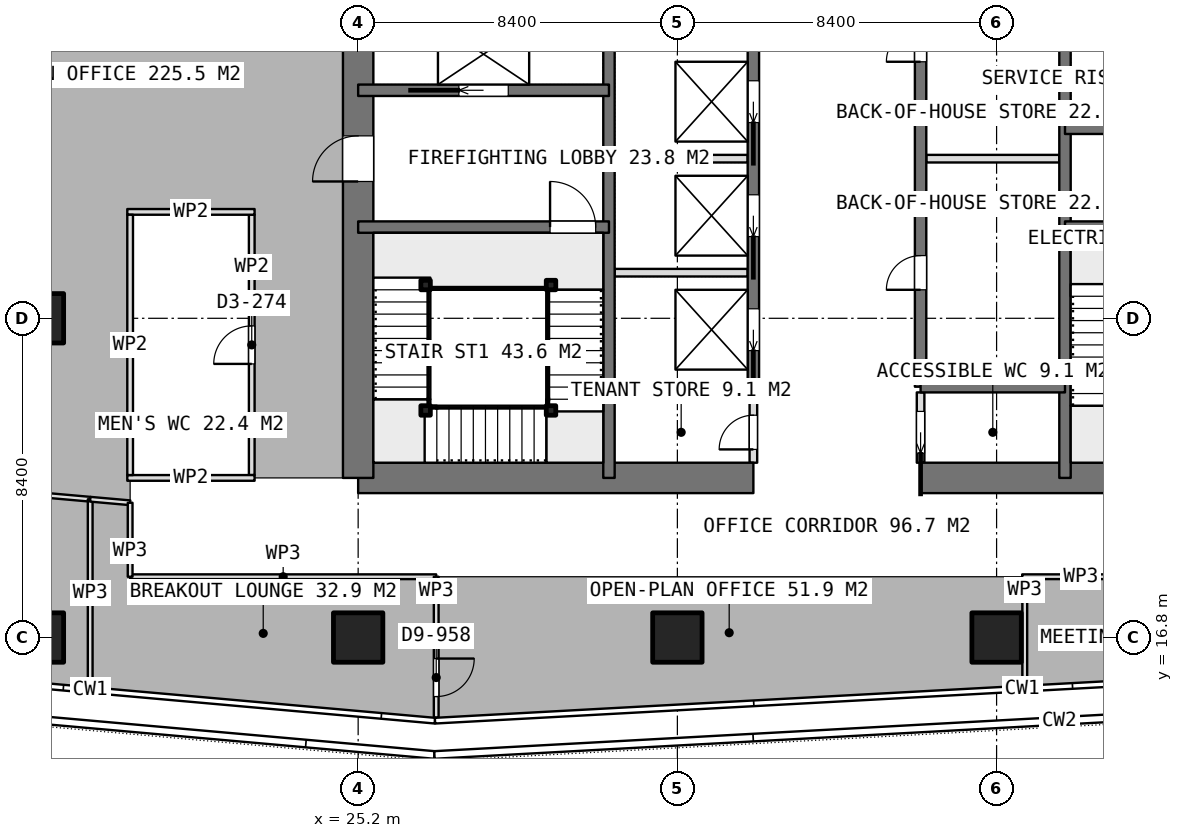
"""IFC4 building model, lengths in metres.
Left out: names, types, materials, properties, quantities, classifications, styles, units other than length and angle.
Written with IfcOpenShell. Run it as: python <this file> out.ifc"""

import sys

from ifc_helpers import new_model, si_unit, direction, frame, frame_2d, origin, origin_2d, place, context, subcontext, project, spatial, rectangle, extrude, element, fill, save


model = new_model("IFC4")
c1 = context("Model", 3, precision=1e-05, world=origin(), true_north=direction((0.0, 1.0)))
c2 = subcontext(c1, "Body", "Model", "MODEL_VIEW")
j1 = project(units=[si_unit("LENGTHUNIT", "METRE"), si_unit("PLANEANGLEUNIT", "RADIAN")], contexts=[c1])
p1 = place(None, origin())
s1 = spatial("IfcSite", under=j1, at=p1, CompositionType="ELEMENT")
p2 = place(p1, origin())
s2 = spatial("IfcBuilding", under=s1, at=p2, CompositionType="ELEMENT")
p3 = place(p2, frame((0.0, 0.0, 257.6)))
s3 = spatial("IfcBuildingStorey", under=s2, at=p3, CompositionType="ELEMENT", Elevation=257.6)
p4 = place(p3, frame((25.2, 21.0, 0.0), z_axis=(0.0, 0.0, 1.0), x_axis=(1.0, 0.0, 0.0)))
e1 = element("IfcWall", 1, at=p4, inside=s3, PredefinedType="SHEAR", context=c2, shape_type="SweptSolid", body=[
    extrude(rectangle(XDim=10.4, YDim=0.8, at=frame_2d((5.2, 0.0))), origin(), (0.0, 0.0, 1.0), 3.75),
])
p5 = place(p3, frame((40.0, 21.0, 0.0), z_axis=(0.0, 0.0, 1.0), x_axis=(1.0, 0.0, 0.0)))
e2 = element("IfcWall", 2, at=p5, inside=s3, PredefinedType="SHEAR", context=c2, shape_type="SweptSolid", body=[
    extrude(rectangle(XDim=10.4, YDim=0.8, at=frame_2d((5.2, 0.0))), origin(), (0.0, 0.0, 1.0), 3.75),
])
p6 = place(p3, frame((25.2, 21.0, 0.0), z_axis=(0.0, 0.0, 1.0), x_axis=(0.0, 1.0, 0.0)))
e3 = element("IfcWall", 3, at=p6, inside=s3, PredefinedType="SHEAR", context=c2, shape_type="SweptSolid", body=[
    extrude(rectangle(XDim=25.2, YDim=0.8, at=frame_2d((12.6, 0.0))), origin(), (0.0, 0.0, 1.0), 3.75),
])
p7 = place(p6, frame((7.8, 0.0, 0.0)))
e4 = element("IfcOpeningElement", 4, at=p7, cuts=e3, PredefinedType="OPENING", context=c2, shape_type="SweptSolid", body=[
    extrude(rectangle(XDim=1.2, YDim=2.1, at=frame_2d((0.6, 1.05))), frame((0.0, 0.41, 0.0), z_axis=(0.0, -1.0, 0.0), x_axis=(1.0, 0.0, 0.0)), (0.0, 0.0, 1.0), 0.82),
])
p8 = place(p6, frame((14.25, 0.0, 0.0)))
e5 = element("IfcOpeningElement", 5, at=p8, cuts=e3, PredefinedType="OPENING", context=c2, shape_type="SweptSolid", body=[
    extrude(rectangle(XDim=0.9, YDim=2.1, at=frame_2d((0.45, 1.05))), frame((0.0, 0.41, 0.0), z_axis=(0.0, -1.0, 0.0), x_axis=(1.0, 0.0, 0.0)), (0.0, 0.0, 1.0), 0.82),
])
p9 = place(p6, frame((16.85, 0.0, 0.0)))
e6 = element("IfcOpeningElement", 6, at=p9, cuts=e3, PredefinedType="OPENING", context=c2, shape_type="SweptSolid", body=[
    extrude(rectangle(XDim=0.9, YDim=2.1, at=frame_2d((0.45, 1.05))), frame((0.0, 0.41, 0.0), z_axis=(0.0, -1.0, 0.0), x_axis=(1.0, 0.0, 0.0)), (0.0, 0.0, 1.0), 0.82),
])
p10 = place(p6, frame((18.95, 0.0, 0.0)))
e7 = element("IfcOpeningElement", 7, at=p10, cuts=e3, PredefinedType="OPENING", context=c2, shape_type="SweptSolid", body=[
    extrude(rectangle(XDim=1.2, YDim=2.1, at=frame_2d((0.6, 1.05))), frame((0.0, 0.41, 0.0), z_axis=(0.0, -1.0, 0.0), x_axis=(1.0, 0.0, 0.0)), (0.0, 0.0, 1.0), 0.82),
])
for number, where, z_axis, x_axis in (
    (8, (31.8, 21.0, 0.0), (0.0, 0.0, 1.0), (0.0, 1.0, 0.0)),
    (9, (43.8, 21.0, 0.0), (0.0, 0.0, 1.0), (0.0, 1.0, 0.0)),
):
    element("IfcWall", number, at=place(p3, frame(where, z_axis=z_axis, x_axis=x_axis)), inside=s3, PredefinedType="SHEAR", context=c2, shape_type="SweptSolid", body=[
        extrude(rectangle(XDim=25.2, YDim=0.3, at=frame_2d((12.6, 0.0))), origin(), (0.0, 0.0, 1.0), 3.75),
    ])
p11 = place(p3, frame((35.6, 23.4, 0.0), z_axis=(0.0, 0.0, 1.0), x_axis=(0.0, 1.0, 0.0)))
e10 = element("IfcWall", 10, at=p11, inside=s3, PredefinedType="SHEAR", context=c2, shape_type="SweptSolid", body=[
    extrude(rectangle(XDim=18.0, YDim=0.3, at=frame_2d((9.0, 0.0))), origin(), (0.0, 0.0, 1.0), 3.75),
])
p12 = place(p11, frame((0.95, 0.0, 0.0)))
e11 = element("IfcOpeningElement", 11, at=p12, cuts=e10, PredefinedType="OPENING", context=c2, shape_type="SweptSolid", body=[
    extrude(rectangle(XDim=1.1, YDim=2.1, at=frame_2d((0.55, 1.05))), frame((0.0, 0.16, 0.0), z_axis=(0.0, -1.0, 0.0), x_axis=(1.0, 0.0, 0.0)), (0.0, 0.0, 1.0), 0.32),
])
p13 = place(p11, frame((3.95, 0.0, 0.0)))
e12 = element("IfcOpeningElement", 12, at=p13, cuts=e10, PredefinedType="OPENING", context=c2, shape_type="SweptSolid", body=[
    extrude(rectangle(XDim=1.1, YDim=2.1, at=frame_2d((0.55, 1.05))), frame((0.0, 0.16, 0.0), z_axis=(0.0, -1.0, 0.0), x_axis=(1.0, 0.0, 0.0)), (0.0, 0.0, 1.0), 0.32),
])
p14 = place(p11, frame((6.95, 0.0, 0.0)))
e13 = element("IfcOpeningElement", 13, at=p14, cuts=e10, PredefinedType="OPENING", context=c2, shape_type="SweptSolid", body=[
    extrude(rectangle(XDim=1.1, YDim=2.1, at=frame_2d((0.55, 1.05))), frame((0.0, 0.16, 0.0), z_axis=(0.0, -1.0, 0.0), x_axis=(1.0, 0.0, 0.0)), (0.0, 0.0, 1.0), 0.32),
])
p15 = place(p11, frame((9.95, 0.0, 0.0)))
e14 = element("IfcOpeningElement", 14, at=p15, cuts=e10, PredefinedType="OPENING", context=c2, shape_type="SweptSolid", body=[
    extrude(rectangle(XDim=1.1, YDim=2.1, at=frame_2d((0.55, 1.05))), frame((0.0, 0.16, 0.0), z_axis=(0.0, -1.0, 0.0), x_axis=(1.0, 0.0, 0.0)), (0.0, 0.0, 1.0), 0.32),
])
p16 = place(p11, frame((12.95, 0.0, 0.0)))
e15 = element("IfcOpeningElement", 15, at=p16, cuts=e10, PredefinedType="OPENING", context=c2, shape_type="SweptSolid", body=[
    extrude(rectangle(XDim=1.1, YDim=2.1, at=frame_2d((0.55, 1.05))), frame((0.0, 0.16, 0.0), z_axis=(0.0, -1.0, 0.0), x_axis=(1.0, 0.0, 0.0)), (0.0, 0.0, 1.0), 0.32),
])
p17 = place(p11, frame((15.95, 0.0, 0.0)))
e16 = element("IfcOpeningElement", 16, at=p17, cuts=e10, PredefinedType="OPENING", context=c2, shape_type="SweptSolid", body=[
    extrude(rectangle(XDim=1.1, YDim=2.1, at=frame_2d((0.55, 1.05))), frame((0.0, 0.16, 0.0), z_axis=(0.0, -1.0, 0.0), x_axis=(1.0, 0.0, 0.0)), (0.0, 0.0, 1.0), 0.32),
])
p18 = place(p3, frame((40.0, 23.4, 0.0), z_axis=(0.0, 0.0, 1.0), x_axis=(0.0, 1.0, 0.0)))
e17 = element("IfcWall", 17, at=p18, inside=s3, PredefinedType="SHEAR", context=c2, shape_type="SweptSolid", body=[
    extrude(rectangle(XDim=18.0, YDim=0.3, at=frame_2d((9.0, 0.0))), origin(), (0.0, 0.0, 1.0), 3.75),
])
p19 = place(p18, frame((2.55, 0.0, 0.0)))
e18 = element("IfcOpeningElement", 18, at=p19, cuts=e17, PredefinedType="OPENING", context=c2, shape_type="SweptSolid", body=[
    extrude(rectangle(XDim=0.9, YDim=2.1, at=frame_2d((0.45, 1.05))), frame((0.0, 0.16, 0.0), z_axis=(0.0, -1.0, 0.0), x_axis=(1.0, 0.0, 0.0)), (0.0, 0.0, 1.0), 0.32),
])
p20 = place(p18, frame((8.55, 0.0, 0.0)))
e19 = element("IfcOpeningElement", 19, at=p20, cuts=e17, PredefinedType="OPENING", context=c2, shape_type="SweptSolid", body=[
    extrude(rectangle(XDim=0.9, YDim=2.1, at=frame_2d((0.45, 1.05))), frame((0.0, 0.16, 0.0), z_axis=(0.0, -1.0, 0.0), x_axis=(1.0, 0.0, 0.0)), (0.0, 0.0, 1.0), 0.32),
])
for number, where, z_axis, x_axis in (
    (20, (31.8, 23.4, 0.0), (0.0, 0.0, 1.0), (1.0, 0.0, 0.0)),
    (21, (40.0, 23.4, 0.0), (0.0, 0.0, 1.0), (1.0, 0.0, 0.0)),
):
    element("IfcWall", number, at=place(p3, frame(where, z_axis=z_axis, x_axis=x_axis)), inside=s3, PredefinedType="SHEAR", context=c2, shape_type="SweptSolid", body=[
        extrude(rectangle(XDim=3.8, YDim=0.3, at=frame_2d((1.9, 0.0))), origin(), (0.0, 0.0, 1.0), 3.75),
    ])
p21 = place(p3, frame((25.2, 27.6, 0.0), z_axis=(0.0, 0.0, 1.0), x_axis=(1.0, 0.0, 0.0)))
e22 = element("IfcWall", 22, at=p21, inside=s3, PredefinedType="SHEAR", context=c2, shape_type="SweptSolid", body=[
    extrude(rectangle(XDim=6.6, YDim=0.3, at=frame_2d((3.3, 0.0))), origin(), (0.0, 0.0, 1.0), 3.75),
])
p22 = place(p21, frame((5.05, 0.0, 0.0)))
e23 = element("IfcOpeningElement", 23, at=p22, cuts=e22, PredefinedType="OPENING", context=c2, shape_type="SweptSolid", body=[
    extrude(rectangle(XDim=1.2, YDim=2.1, at=frame_2d((0.6, 1.05))), frame((0.0, 0.16, 0.0), z_axis=(0.0, -1.0, 0.0), x_axis=(1.0, 0.0, 0.0)), (0.0, 0.0, 1.0), 0.32),
])
p23 = place(p3, frame((25.2, 31.2, 0.0), z_axis=(0.0, 0.0, 1.0), x_axis=(1.0, 0.0, 0.0)))
e24 = element("IfcWall", 24, at=p23, inside=s3, PredefinedType="SHEAR", context=c2, shape_type="SweptSolid", body=[
    extrude(rectangle(XDim=6.6, YDim=0.3, at=frame_2d((3.3, 0.0))), origin(), (0.0, 0.0, 1.0), 3.75),
])
p24 = place(p23, frame((2.65, 0.0, 0.0)))
e25 = element("IfcOpeningElement", 25, at=p24, cuts=e24, PredefinedType="OPENING", context=c2, shape_type="SweptSolid", body=[
    extrude(rectangle(XDim=1.3, YDim=2.1, at=frame_2d((0.65, 1.05))), frame((0.0, 0.16, 0.0), z_axis=(0.0, -1.0, 0.0), x_axis=(1.0, 0.0, 0.0)), (0.0, 0.0, 1.0), 0.32),
])
for number, where, z_axis, x_axis in (
    (26, (43.8, 27.6, 0.0), (0.0, 0.0, 1.0), (1.0, 0.0, 0.0)),
    (27, (43.8, 30.2, 0.0), (0.0, 0.0, 1.0), (1.0, 0.0, 0.0)),
):
    element("IfcWall", number, at=place(p3, frame(where, z_axis=z_axis, x_axis=x_axis)), inside=s3, PredefinedType="SHEAR", context=c2, shape_type="SweptSolid", body=[
        extrude(rectangle(XDim=6.6, YDim=0.3, at=frame_2d((3.3, 0.0))), origin(), (0.0, 0.0, 1.0), 3.75),
    ])
for number, where, z_axis, x_axis in (
    (28, (16.8, 16.8, 0.0), (0.0, 0.0, 1.0), (1.0, 0.0, 0.0)),
    (29, (16.8, 25.2, 0.0), (0.0, 0.0, 1.0), (1.0, 0.0, 0.0)),
    (30, (25.2, 16.8, 0.0), (0.0, 0.0, 1.0), (1.0, 0.0, 0.0)),
    (31, (33.6, 16.8, 0.0), (0.0, 0.0, 1.0), (1.0, 0.0, 0.0)),
    (32, (42.0, 16.8, 0.0), (0.0, 0.0, 1.0), (1.0, 0.0, 0.0)),
):
    element("IfcColumn", number, at=place(p3, frame(where, z_axis=z_axis, x_axis=x_axis)), inside=s3, PredefinedType="COLUMN", context=c2, shape_type="SweptSolid", body=[
        extrude(rectangle(XDim=1.3, YDim=1.3, at=origin_2d()), origin(), (0.0, 0.0, 1.0), 3.75),
    ])
for number, where, z_axis, x_axis in (
    (33, (31.95, 26.4, 0.0), (0.0, 0.0, 1.0), (1.0, 0.0, 0.0)),
    (34, (31.95, 29.4, 0.0), (0.0, 0.0, 1.0), (1.0, 0.0, 0.0)),
    (35, (40.15, 29.4, 0.0), (0.0, 0.0, 1.0), (1.0, 0.0, 0.0)),
):
    element("IfcWall", number, at=place(p3, frame(where, z_axis=z_axis, x_axis=x_axis)), inside=s3, PredefinedType="PARTITIONING", context=c2, shape_type="SweptSolid", body=[
        extrude(rectangle(XDim=3.5, YDim=0.2, at=frame_2d((1.75, 0.0))), origin(), (0.0, 0.0, 1.0), 3.5),
    ])
p25 = place(p3, frame((40.0, 21.4, 0.0), z_axis=(0.0, 0.0, 1.0), x_axis=(0.0, 1.0, 0.0)))
e36 = element("IfcWall", 36, at=p25, inside=s3, PredefinedType="PARTITIONING", context=c2, shape_type="SweptSolid", body=[
    extrude(rectangle(XDim=1.85, YDim=0.2, at=frame_2d((0.925, 0.0))), origin(), (0.0, 0.0, 1.0), 3.5),
])
p26 = place(p25, frame((0.25, 0.0, 0.0)))
e37 = element("IfcOpeningElement", 37, at=p26, cuts=e36, PredefinedType="OPENING", context=c2, shape_type="SweptSolid", body=[
    extrude(rectangle(XDim=1.1, YDim=2.1, at=frame_2d((0.55, 1.05))), frame((0.0, 0.11, 0.0), z_axis=(0.0, -1.0, 0.0), x_axis=(1.0, 0.0, 0.0)), (0.0, 0.0, 1.0), 0.22),
])
p27 = place(p3, frame((35.6, 21.4, 0.0), z_axis=(0.0, 0.0, 1.0), x_axis=(0.0, 1.0, 0.0)))
e38 = element("IfcWall", 38, at=p27, inside=s3, PredefinedType="PARTITIONING", context=c2, shape_type="SweptSolid", body=[
    extrude(rectangle(XDim=1.85, YDim=0.2, at=frame_2d((0.925, 0.0))), origin(), (0.0, 0.0, 1.0), 3.5),
])
p28 = place(p27, frame((0.35, 0.0, 0.0)))
e39 = element("IfcOpeningElement", 39, at=p28, cuts=e38, PredefinedType="OPENING", context=c2, shape_type="SweptSolid", body=[
    extrude(rectangle(XDim=0.9, YDim=2.1, at=frame_2d((0.45, 1.05))), frame((0.0, 0.11, 0.0), z_axis=(0.0, -1.0, 0.0), x_axis=(1.0, 0.0, 0.0)), (0.0, 0.0, 1.0), 0.22),
])
for number, where, z_axis, x_axis in (
    (40, (19.125, 21.0, 0.0), (0.0, 0.0, 1.0), (1.0, 0.0, 0.0)),
    (41, (19.125, 28.0, 0.0), (0.0, 0.0, 1.0), (1.0, 0.0, 0.0)),
):
    element("IfcWall", number, at=place(p3, frame(where, z_axis=z_axis, x_axis=x_axis)), inside=s3, PredefinedType="PARTITIONING", context=c2, shape_type="SweptSolid", body=[
        extrude(rectangle(XDim=3.35, YDim=0.15, at=frame_2d((1.675, 0.0))), origin(), (0.0, 0.0, 1.0), 3.5),
    ])
p29 = place(p3, frame((19.2, 21.075, 0.0), z_axis=(0.0, 0.0, 1.0), x_axis=(0.0, 1.0, 0.0)))
e42 = element("IfcWall", 42, at=p29, inside=s3, PredefinedType="PARTITIONING", context=c2, shape_type="SweptSolid", body=[
    extrude(rectangle(XDim=6.85, YDim=0.15, at=frame_2d((3.425, 0.0))), origin(), (0.0, 0.0, 1.0), 3.5),
])
p30 = place(p3, frame((22.4, 21.075, 0.0), z_axis=(0.0, 0.0, 1.0), x_axis=(0.0, 1.0, 0.0)))
e43 = element("IfcWall", 43, at=p30, inside=s3, PredefinedType="PARTITIONING", context=c2, shape_type="SweptSolid", body=[
    extrude(rectangle(XDim=6.85, YDim=0.15, at=frame_2d((3.425, 0.0))), origin(), (0.0, 0.0, 1.0), 3.5),
])
p31 = place(p30, frame((2.925, 0.0, 0.0)))
e44 = element("IfcOpeningElement", 44, at=p31, cuts=e43, PredefinedType="OPENING", context=c2, shape_type="SweptSolid", body=[
    extrude(rectangle(XDim=1.0, YDim=2.1, at=frame_2d((0.5, 1.05))), frame((0.0, 0.085, 0.0), z_axis=(0.0, -1.0, 0.0), x_axis=(1.0, 0.0, 0.0)), (0.0, 0.0, 1.0), 0.17),
])
p32 = place(p3, frame((42.742, 15.538, 0.0), z_axis=(0.0, 0.0, 1.0), x_axis=(0.0, 1.0, 0.0)))
e45 = element("IfcWall", 45, at=p32, inside=s3, PredefinedType="PARTITIONING", context=c2, shape_type="SweptSolid", body=[
    extrude(rectangle(XDim=2.799, YDim=0.125, at=frame_2d((1.399, 0.0))), origin(), (0.0, 0.0, 1.0), 3.5),
])
p33 = place(p3, frame((42.674, 18.4, 0.0), z_axis=(0.0, 0.0, 1.0), x_axis=(1.0, 0.0, 0.0)))
e46 = element("IfcWall", 46, at=p33, inside=s3, PredefinedType="PARTITIONING", context=c2, shape_type="SweptSolid", body=[
    extrude(rectangle(XDim=7.726, YDim=0.125, at=frame_2d((3.863, 0.0))), origin(), (0.0, 0.0, 1.0), 3.5),
])
p34 = place(p33, frame((3.363, 0.0, 0.0)))
e47 = element("IfcOpeningElement", 47, at=p34, cuts=e46, PredefinedType="OPENING", context=c2, shape_type="SweptSolid", body=[
    extrude(rectangle(XDim=1.0, YDim=2.1, at=frame_2d((0.5, 1.05))), frame((0.0, 0.073, 0.0), z_axis=(0.0, -1.0, 0.0), x_axis=(1.0, 0.0, 0.0)), (0.0, 0.0, 1.0), 0.145),
])
p35 = place(p3, frame((12.261, 20.962, 0.0), z_axis=(0.0, 0.0, 1.0), x_axis=(0.996078951833, -0.08846876124, 0.0)))
e48 = element("IfcWall", 48, at=p35, inside=s3, PredefinedType="PARTITIONING", context=c2, shape_type="SweptSolid", body=[
    extrude(rectangle(XDim=5.911, YDim=0.125, at=frame_2d((2.956, 0.0))), origin(), (0.0, 0.0, 1.0), 3.5),
])
p36 = place(p3, frame((18.149, 20.439, 0.0), z_axis=(0.0, 0.0, 1.0), x_axis=(0.0, -1.0, 0.0)))
e49 = element("IfcWall", 49, at=p36, inside=s3, PredefinedType="PARTITIONING", context=c2, shape_type="SweptSolid", body=[
    extrude(rectangle(XDim=4.939, YDim=0.125, at=frame_2d((2.469, 0.0))), origin(), (0.0, 0.0, 1.0), 3.5),
])
p37 = place(p3, frame((19.2, 18.4, 0.0), z_axis=(0.0, 0.0, 1.0), x_axis=(1.0, 0.0, 0.0)))
e50 = element("IfcWall", 50, at=p37, inside=s3, PredefinedType="PARTITIONING", context=c2, shape_type="SweptSolid", body=[
    extrude(rectangle(XDim=8.054, YDim=0.125, at=frame_2d((4.027, 0.0))), origin(), (0.0, 0.0, 1.0), 3.5),
])
p38 = place(p3, frame((27.254, 18.4, 0.0), z_axis=(0.0, 0.0, 1.0), x_axis=(0.0, -1.0, 0.0)))
e51 = element("IfcWall", 51, at=p38, inside=s3, PredefinedType="PARTITIONING", context=c2, shape_type="SweptSolid", body=[
    extrude(rectangle(XDim=3.705, YDim=0.125, at=frame_2d((1.853, 0.0))), origin(), (0.0, 0.0, 1.0), 3.5),
])
p39 = place(p38, frame((2.153, 0.0, 0.0)))
e52 = element("IfcOpeningElement", 52, at=p39, cuts=e51, PredefinedType="OPENING", context=c2, shape_type="SweptSolid", body=[
    extrude(rectangle(XDim=1.0, YDim=2.1, at=frame_2d((0.5, 1.05))), frame((0.0, 0.073, 0.0), z_axis=(0.0, -1.0, 0.0), x_axis=(1.0, 0.0, 0.0)), (0.0, 0.0, 1.0), 0.145),
])
p40 = place(p3, frame((18.15, 20.439, 0.0), z_axis=(0.0, 0.0, 1.0), x_axis=(0.996099374617, -0.088238517026, 0.0)))
e53 = element("IfcWall", 53, at=p40, inside=s3, PredefinedType="PARTITIONING", context=c2, shape_type="SweptSolid", body=[
    extrude(rectangle(XDim=1.054, YDim=0.125, at=frame_2d((0.527, 0.0))), origin(), (0.0, 0.0, 1.0), 3.5),
])
p41 = place(p3, frame((19.2, 20.346, 0.0), z_axis=(0.0, 0.0, 1.0), x_axis=(0.0, -1.0, 0.0)))
e54 = element("IfcWall", 54, at=p41, inside=s3, PredefinedType="PARTITIONING", context=c2, shape_type="SweptSolid", body=[
    extrude(rectangle(XDim=1.946, YDim=0.125, at=frame_2d((0.973, 0.0))), origin(), (0.0, 0.0, 1.0), 3.5),
])
for number, where, z_axis, x_axis in (
    (55, (30.275, 26.075, 0.0), (0.0, 0.0, 1.0), (1.0, 0.0, 0.0)),
    (56, (30.275, 22.775, 0.0), (0.0, 0.0, 1.0), (1.0, 0.0, 0.0)),
    (57, (26.975, 22.775, 0.0), (0.0, 0.0, 1.0), (1.0, 0.0, 0.0)),
    (58, (26.975, 26.075, 0.0), (0.0, 0.0, 1.0), (1.0, 0.0, 0.0)),
):
    element("IfcColumn", number, at=place(p3, frame(where, z_axis=z_axis, x_axis=x_axis)), inside=s3, PredefinedType="COLUMN", context=c2, shape_type="SweptSolid", body=[
        extrude(rectangle(XDim=0.25, YDim=0.25, at=origin_2d()), origin(), (0.0, 0.0, 1.0), 3.75),
    ])
p42 = place(p7, origin())
e59 = element("IfcDoor", 59, at=p42, inside=s3, OperationType="SINGLE_SWING_LEFT", PredefinedType="DOOR", context=c2, shape_type="SweptSolid", body=[
    extrude(rectangle(XDim=1.2, YDim=2.1, at=frame_2d((0.6, 1.05))), frame((0.0, 0.025, 0.0), z_axis=(0.0, -1.0, 0.0), x_axis=(1.0, 0.0, 0.0)), (0.0, 0.0, 1.0), 0.05),
])
fill(e4, e59)
p43 = place(p26, origin())
e60 = element("IfcDoor", 60, at=p43, inside=s3, OperationType="SLIDING_TO_LEFT", PredefinedType="DOOR", context=c2, shape_type="SweptSolid", body=[
    extrude(rectangle(XDim=1.1, YDim=2.1, at=frame_2d((0.55, 1.05))), frame((0.0, 0.025, 0.0), z_axis=(0.0, -1.0, 0.0), x_axis=(1.0, 0.0, 0.0)), (0.0, 0.0, 1.0), 0.05),
])
fill(e37, e60)
p44 = place(p28, origin())
e61 = element("IfcDoor", 61, at=p44, inside=s3, OperationType="SINGLE_SWING_LEFT", PredefinedType="DOOR", context=c2, shape_type="SweptSolid", body=[
    extrude(rectangle(XDim=0.9, YDim=2.1, at=frame_2d((0.45, 1.05))), frame((0.0, 0.025, 0.0), z_axis=(0.0, -1.0, 0.0), x_axis=(1.0, 0.0, 0.0)), (0.0, 0.0, 1.0), 0.05),
])
fill(e39, e61)
p45 = place(p19, origin())
e62 = element("IfcDoor", 62, at=p45, inside=s3, OperationType="SINGLE_SWING_LEFT", PredefinedType="DOOR", context=c2, shape_type="SweptSolid", body=[
    extrude(rectangle(XDim=0.9, YDim=2.1, at=frame_2d((0.45, 1.05))), frame((0.0, 0.025, 0.0), z_axis=(0.0, -1.0, 0.0), x_axis=(1.0, 0.0, 0.0)), (0.0, 0.0, 1.0), 0.05),
])
fill(e18, e62)
p46 = place(p20, origin())
e63 = element("IfcDoor", 63, at=p46, inside=s3, OperationType="SINGLE_SWING_LEFT", PredefinedType="DOOR", context=c2, shape_type="SweptSolid", body=[
    extrude(rectangle(XDim=0.9, YDim=2.1, at=frame_2d((0.45, 1.05))), frame((0.0, 0.025, 0.0), z_axis=(0.0, -1.0, 0.0), x_axis=(1.0, 0.0, 0.0)), (0.0, 0.0, 1.0), 0.05),
])
fill(e19, e63)
p47 = place(p12, origin())
e64 = element("IfcDoor", 64, at=p47, inside=s3, OperationType="SLIDING_TO_LEFT", PredefinedType="USERDEFINED", context=c2, shape_type="SweptSolid", body=[
    extrude(rectangle(XDim=1.1, YDim=2.1, at=frame_2d((0.55, 1.05))), frame((0.0, 0.025, 0.0), z_axis=(0.0, -1.0, 0.0), x_axis=(1.0, 0.0, 0.0)), (0.0, 0.0, 1.0), 0.05),
])
fill(e11, e64)
p48 = place(p13, origin())
e65 = element("IfcDoor", 65, at=p48, inside=s3, OperationType="SLIDING_TO_LEFT", PredefinedType="USERDEFINED", context=c2, shape_type="SweptSolid", body=[
    extrude(rectangle(XDim=1.1, YDim=2.1, at=frame_2d((0.55, 1.05))), frame((0.0, 0.025, 0.0), z_axis=(0.0, -1.0, 0.0), x_axis=(1.0, 0.0, 0.0)), (0.0, 0.0, 1.0), 0.05),
])
fill(e12, e65)
p49 = place(p14, origin())
e66 = element("IfcDoor", 66, at=p49, inside=s3, OperationType="SLIDING_TO_LEFT", PredefinedType="USERDEFINED", context=c2, shape_type="SweptSolid", body=[
    extrude(rectangle(XDim=1.1, YDim=2.1, at=frame_2d((0.55, 1.05))), frame((0.0, 0.025, 0.0), z_axis=(0.0, -1.0, 0.0), x_axis=(1.0, 0.0, 0.0)), (0.0, 0.0, 1.0), 0.05),
])
fill(e13, e66)
p50 = place(p24, origin())
e67 = element("IfcDoor", 67, at=p50, inside=s3, OperationType="SLIDING_TO_LEFT", PredefinedType="USERDEFINED", context=c2, shape_type="SweptSolid", body=[
    extrude(rectangle(XDim=1.3, YDim=2.1, at=frame_2d((0.65, 1.05))), frame((0.0, 0.025, 0.0), z_axis=(0.0, -1.0, 0.0), x_axis=(1.0, 0.0, 0.0)), (0.0, 0.0, 1.0), 0.05),
])
fill(e25, e67)
p51 = place(p31, origin())
e68 = element("IfcDoor", 68, at=p51, inside=s3, OperationType="SINGLE_SWING_LEFT", PredefinedType="DOOR", context=c2, shape_type="SweptSolid", body=[
    extrude(rectangle(XDim=1.0, YDim=2.1, at=frame_2d((0.5, 1.05))), frame((0.0, 0.025, 0.0), z_axis=(0.0, -1.0, 0.0), x_axis=(1.0, 0.0, 0.0)), (0.0, 0.0, 1.0), 0.05),
])
fill(e44, e68)
p52 = place(p39, origin())
e69 = element("IfcDoor", 69, at=p52, inside=s3, OperationType="SINGLE_SWING_LEFT", PredefinedType="DOOR", context=c2, shape_type="SweptSolid", body=[
    extrude(rectangle(XDim=1.0, YDim=2.1, at=frame_2d((0.5, 1.05))), frame((0.0, 0.025, 0.0), z_axis=(0.0, -1.0, 0.0), x_axis=(1.0, 0.0, 0.0)), (0.0, 0.0, 1.0), 0.05),
])
fill(e52, e69)
p53 = place(p22, origin())
e70 = element("IfcDoor", 70, at=p53, inside=s3, OperationType="SINGLE_SWING_RIGHT", PredefinedType="DOOR", context=c2, shape_type="SweptSolid", body=[
    extrude(rectangle(XDim=1.2, YDim=2.1, at=frame_2d((0.6, 1.05))), frame((0.0, 0.025, 0.0), z_axis=(0.0, -1.0, 0.0), x_axis=(1.0, 0.0, 0.0)), (0.0, 0.0, 1.0), 0.05),
])
fill(e23, e70)
save(model, sys.argv[1])
